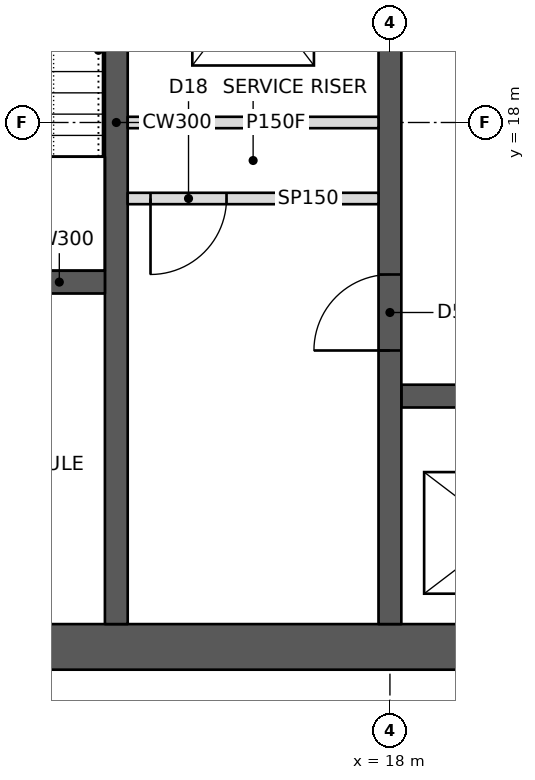
"""IFC4 building model, lengths in metres.
Left out: names, types, materials, properties, quantities, classifications, styles, units other than length and angle.
Written with IfcOpenShell. Run it as: python <this file> out.ifc"""

import sys

from ifc_helpers import new_model, si_unit, direction, frame, frame_2d, origin, place, context, subcontext, project, spatial, rectangle, extrude, element, fill, save


model = new_model("IFC4")
c1 = context("Model", 3, precision=1e-05, world=origin(), true_north=direction((0.0, 1.0)))
c2 = subcontext(c1, "Body", "Model", "MODEL_VIEW")
j1 = project(units=[si_unit("LENGTHUNIT", "METRE"), si_unit("PLANEANGLEUNIT", "RADIAN")], contexts=[c1])
p1 = place(None, origin())
s1 = spatial("IfcSite", under=j1, at=p1, CompositionType="ELEMENT")
p2 = place(p1, origin())
s2 = spatial("IfcBuilding", under=s1, at=p2, CompositionType="ELEMENT")
p3 = place(p2, frame((0.0, 0.0, 255.4)))
s3 = spatial("IfcBuildingStorey", under=s2, at=p3, CompositionType="ELEMENT", Elevation=255.4)
p4 = place(p3, frame((10.8, 11.1, 0.0), z_axis=(0.0, 0.0, 1.0), x_axis=(1.0, 0.0, 0.0)))
e1 = element("IfcWall", 1, at=p4, inside=s3, PredefinedType="SHEAR", context=c2, shape_type="SweptSolid", body=[
    extrude(rectangle(XDim=23.4, YDim=0.6, at=frame_2d((11.7, 0.0))), origin(), (0.0, 0.0, 1.0), 3.6),
])
p5 = place(p4, frame((1.0, 0.0, 0.0)))
e2 = element("IfcOpeningElement", 2, at=p5, cuts=e1, PredefinedType="OPENING", context=c2, shape_type="SweptSolid", body=[
    extrude(rectangle(XDim=1.0, YDim=2.1, at=frame_2d((0.5, 1.05))), frame((0.0, 0.31, 0.0), z_axis=(0.0, -1.0, 0.0), x_axis=(1.0, 0.0, 0.0)), (0.0, 0.0, 1.0), 0.62),
])
p6 = place(p4, frame((17.2, 0.0, 0.0)))
e3 = element("IfcOpeningElement", 3, at=p6, cuts=e1, PredefinedType="OPENING", context=c2, shape_type="SweptSolid", body=[
    extrude(rectangle(XDim=1.8, YDim=2.1, at=frame_2d((0.9, 1.05))), frame((0.0, 0.31, 0.0), z_axis=(0.0, -1.0, 0.0), x_axis=(1.0, 0.0, 0.0)), (0.0, 0.0, 1.0), 0.62),
])
p7 = place(p3, frame((14.4, 11.4, 0.0), z_axis=(0.0, 0.0, 1.0), x_axis=(0.0, 1.0, 0.0)))
e4 = element("IfcWall", 4, at=p7, inside=s3, PredefinedType="SHEAR", context=c2, shape_type="SweptSolid", body=[
    extrude(rectangle(XDim=13.2, YDim=0.3, at=frame_2d((6.6, 0.0))), origin(), (0.0, 0.0, 1.0), 3.6),
])
p8 = place(p3, frame((11.4, 15.9, 0.0), z_axis=(0.0, 0.0, 1.0), x_axis=(1.0, 0.0, 0.0)))
e5 = element("IfcWall", 5, at=p8, inside=s3, PredefinedType="SHEAR", context=c2, shape_type="SweptSolid", body=[
    extrude(rectangle(XDim=2.85, YDim=0.3, at=frame_2d((1.425, 0.0))), origin(), (0.0, 0.0, 1.0), 3.6),
])
p9 = place(p8, frame((0.5, 0.0, 0.0)))
e6 = element("IfcOpeningElement", 6, at=p9, cuts=e5, PredefinedType="OPENING", context=c2, shape_type="SweptSolid", body=[
    extrude(rectangle(XDim=1.0, YDim=2.1, at=frame_2d((0.5, 1.05))), frame((0.0, 0.16, 0.0), z_axis=(0.0, -1.0, 0.0), x_axis=(1.0, 0.0, 0.0)), (0.0, 0.0, 1.0), 0.32),
])
p10 = place(p3, frame((18.0, 11.4, 0.0), z_axis=(0.0, 0.0, 1.0), x_axis=(0.0, 1.0, 0.0)))
e7 = element("IfcWall", 7, at=p10, inside=s3, PredefinedType="SHEAR", context=c2, shape_type="SweptSolid", body=[
    extrude(rectangle(XDim=13.2, YDim=0.3, at=frame_2d((6.6, 0.0))), origin(), (0.0, 0.0, 1.0), 3.6),
])
p11 = place(p10, frame((3.6, 0.0, 0.0)))
e8 = element("IfcOpeningElement", 8, at=p11, cuts=e7, PredefinedType="OPENING", context=c2, shape_type="SweptSolid", body=[
    extrude(rectangle(XDim=1.0, YDim=2.1, at=frame_2d((0.5, 1.05))), frame((0.0, 0.16, 0.0), z_axis=(0.0, -1.0, 0.0), x_axis=(1.0, 0.0, 0.0)), (0.0, 0.0, 1.0), 0.32),
])
p12 = place(p10, frame((7.85, 0.0, 0.0)))
e9 = element("IfcOpeningElement", 9, at=p12, cuts=e7, PredefinedType="OPENING", context=c2, shape_type="SweptSolid", body=[
    extrude(rectangle(XDim=1.1, YDim=2.1, at=frame_2d((0.55, 1.05))), frame((0.0, 0.16, 0.0), z_axis=(0.0, -1.0, 0.0), x_axis=(1.0, 0.0, 0.0)), (0.0, 0.0, 1.0), 0.32),
])
p13 = place(p3, frame((14.55, 18.0, 0.0), z_axis=(0.0, 0.0, 1.0), x_axis=(1.0, 0.0, 0.0)))
e10 = element("IfcWall", 10, at=p13, inside=s3, PredefinedType="PARTITIONING", context=c2, shape_type="SweptSolid", body=[
    extrude(rectangle(XDim=3.3, YDim=0.15, at=frame_2d((1.65, 0.0))), origin(), (0.0, 0.0, 1.0), 3.4),
])
p14 = place(p3, frame((18.15, 14.4, 0.0), z_axis=(0.0, 0.0, 1.0), x_axis=(1.0, 0.0, 0.0)))
e11 = element("IfcWall", 11, at=p14, inside=s3, PredefinedType="SHEAR", context=c2, shape_type="SweptSolid", body=[
    extrude(rectangle(XDim=9.0, YDim=0.3, at=frame_2d((4.5, 0.0))), origin(), (0.0, 0.0, 1.0), 3.6),
])
p15 = place(p14, frame((0.8, 0.0, 0.0)))
e12 = element("IfcOpeningElement", 12, at=p15, cuts=e11, PredefinedType="OPENING", context=c2, shape_type="SweptSolid", body=[
    extrude(rectangle(XDim=1.1, YDim=2.1, at=frame_2d((0.55, 1.05))), frame((0.0, 0.16, 0.0), z_axis=(0.0, -1.0, 0.0), x_axis=(1.0, 0.0, 0.0)), (0.0, 0.0, 1.0), 0.32),
])
p16 = place(p14, frame((6.75, 0.0, 0.0)))
e13 = element("IfcOpeningElement", 13, at=p16, cuts=e11, PredefinedType="OPENING", context=c2, shape_type="SweptSolid", body=[
    extrude(rectangle(XDim=1.2, YDim=2.1, at=frame_2d((0.6, 1.05))), frame((0.0, 0.16, 0.0), z_axis=(0.0, -1.0, 0.0), x_axis=(1.0, 0.0, 0.0)), (0.0, 0.0, 1.0), 0.32),
])
p17 = place(p14, frame((3.8, 0.0, 0.0)))
e14 = element("IfcOpeningElement", 14, at=p17, cuts=e11, PredefinedType="OPENING", context=c2, shape_type="SweptSolid", body=[
    extrude(rectangle(XDim=1.1, YDim=2.1, at=frame_2d((0.55, 1.05))), frame((0.0, 0.16, 0.0), z_axis=(0.0, -1.0, 0.0), x_axis=(1.0, 0.0, 0.0)), (0.0, 0.0, 1.0), 0.32),
])
p18 = place(p3, frame((14.55, 17.0, 0.0), z_axis=(0.0, 0.0, 1.0), x_axis=(1.0, 0.0, 0.0)))
e15 = element("IfcWall", 15, at=p18, inside=s3, PredefinedType="PARTITIONING", context=c2, shape_type="SweptSolid", body=[
    extrude(rectangle(XDim=3.3, YDim=0.15, at=frame_2d((1.65, 0.0))), origin(), (0.0, 0.0, 1.0), 3.4),
])
p19 = place(p18, frame((0.3, 0.0, 0.0)))
e16 = element("IfcOpeningElement", 16, at=p19, cuts=e15, PredefinedType="OPENING", context=c2, shape_type="SweptSolid", body=[
    extrude(rectangle(XDim=1.0, YDim=2.1, at=frame_2d((0.5, 1.05))), frame((0.0, 0.085, 0.0), z_axis=(0.0, -1.0, 0.0), x_axis=(1.0, 0.0, 0.0)), (0.0, 0.0, 1.0), 0.17),
])
p20 = place(p19, frame((1.0, 0.0, 0.0), z_axis=(0.0, 0.0, 1.0), x_axis=(-1.0, 0.0, 0.0)))
e17 = element("IfcDoor", 17, at=p20, inside=s3, OperationType="SINGLE_SWING_RIGHT", PredefinedType="DOOR", context=c2, shape_type="SweptSolid", body=[
    extrude(rectangle(XDim=1.0, YDim=2.1, at=frame_2d((0.5, 1.05))), frame((0.0, 0.025, 0.0), z_axis=(0.0, -1.0, 0.0), x_axis=(1.0, 0.0, 0.0)), (0.0, 0.0, 1.0), 0.05),
])
fill(e16, e17)
p21 = place(p11, origin())
e18 = element("IfcDoor", 18, at=p21, inside=s3, OperationType="SINGLE_SWING_LEFT", PredefinedType="DOOR", context=c2, shape_type="SweptSolid", body=[
    extrude(rectangle(XDim=1.0, YDim=2.1, at=frame_2d((0.5, 1.05))), frame((0.0, 0.025, 0.0), z_axis=(0.0, -1.0, 0.0), x_axis=(1.0, 0.0, 0.0)), (0.0, 0.0, 1.0), 0.05),
])
fill(e8, e18)
save(model, sys.argv[1])
